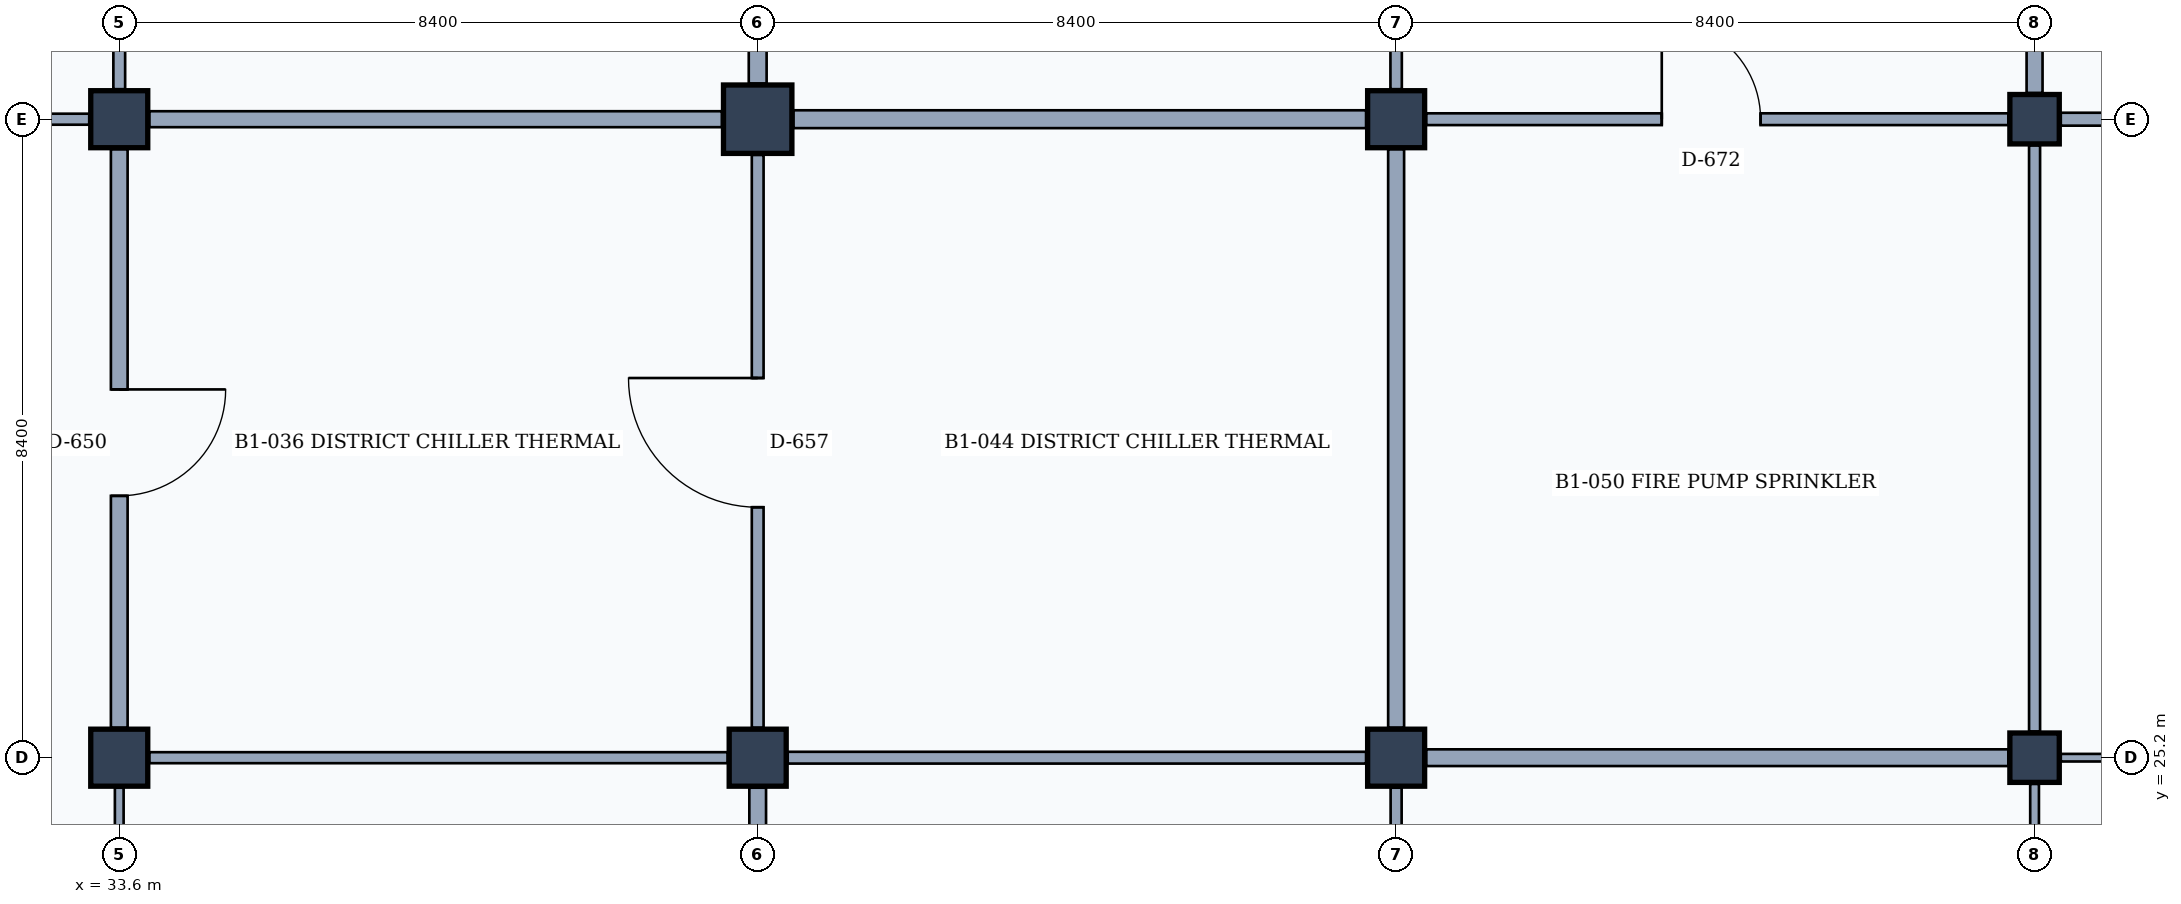
"""IFC4 building model, lengths in metres.
Left out: names, types, materials, properties, quantities, classifications, styles, units other than length and angle.
Written with IfcOpenShell. Run it as: python <this file> out.ifc"""

import sys

from ifc_helpers import new_model, si_unit, direction, frame, frame_2d, origin, origin_2d, place, context, subcontext, project, spatial, rectangle, extrude, element, fill, save


model = new_model("IFC4")
c1 = context("Model", 3, precision=1e-05, world=origin(), true_north=direction((0.0, 1.0)))
c2 = subcontext(c1, "Body", "Model", "MODEL_VIEW")
j1 = project(units=[si_unit("LENGTHUNIT", "METRE"), si_unit("PLANEANGLEUNIT", "RADIAN")], contexts=[c1])
p1 = place(None, origin())
s1 = spatial("IfcSite", under=j1, at=p1, CompositionType="ELEMENT")
p2 = place(p1, origin())
s2 = spatial("IfcBuilding", under=s1, at=p2, CompositionType="ELEMENT")
p3 = place(p2, frame((0.0, 0.0, -4.2)))
s3 = spatial("IfcBuildingStorey", under=s2, at=p3, CompositionType="ELEMENT", Elevation=-4.2)
for number, where, z_axis, x_axis in (
    (1, (33.6, 25.2, 0.0), (0.0, 0.0, 1.0), (1.0, 0.0, 0.0)),
    (2, (33.6, 33.6, 0.0), (0.0, 0.0, 1.0), (1.0, 0.0, 0.0)),
    (3, (42.0, 25.2, 0.0), (0.0, 0.0, 1.0), (1.0, 0.0, 0.0)),
):
    element("IfcColumn", number, at=place(p3, frame(where, z_axis=z_axis, x_axis=x_axis)), inside=s3, PredefinedType="COLUMN", context=c2, shape_type="SweptSolid", body=[
        extrude(rectangle(XDim=0.75, YDim=0.75, at=origin_2d()), origin(), (0.0, 0.0, 1.0), 4.2),
    ])
p4 = place(p3, frame((42.0, 33.6, 0.0), z_axis=(0.0, 0.0, 1.0), x_axis=(1.0, 0.0, 0.0)))
e4 = element("IfcColumn", 4, at=p4, inside=s3, PredefinedType="COLUMN", context=c2, shape_type="SweptSolid", body=[
    extrude(rectangle(XDim=0.9, YDim=0.9, at=origin_2d()), origin(), (0.0, 0.0, 1.0), 4.2),
])
for number, where, z_axis, x_axis in (
    (5, (50.4, 25.2, 0.0), (0.0, 0.0, 1.0), (1.0, 0.0, 0.0)),
    (6, (50.4, 33.6, 0.0), (0.0, 0.0, 1.0), (1.0, 0.0, 0.0)),
):
    element("IfcColumn", number, at=place(p3, frame(where, z_axis=z_axis, x_axis=x_axis)), inside=s3, PredefinedType="COLUMN", context=c2, shape_type="SweptSolid", body=[
        extrude(rectangle(XDim=0.75, YDim=0.75, at=origin_2d()), origin(), (0.0, 0.0, 1.0), 4.2),
    ])
for number, where, z_axis, x_axis in (
    (7, (58.8, 25.2, 0.0), (0.0, 0.0, 1.0), (1.0, 0.0, 0.0)),
    (8, (58.8, 33.6, 0.0), (0.0, 0.0, 1.0), (1.0, 0.0, 0.0)),
):
    element("IfcColumn", number, at=place(p3, frame(where, z_axis=z_axis, x_axis=x_axis)), inside=s3, PredefinedType="COLUMN", context=c2, shape_type="SweptSolid", body=[
        extrude(rectangle(XDim=0.65, YDim=0.65, at=origin_2d()), origin(), (0.0, 0.0, 1.0), 4.2),
    ])
p5 = place(p3, frame((33.6, 17.195, 0.0), z_axis=(0.0, 0.0, 1.0), x_axis=(0.0, 1.0, 0.0)))
e9 = element("IfcWall", 9, at=p5, inside=s3, PredefinedType="PARTITIONING", context=c2, shape_type="SweptSolid", body=[
    extrude(rectangle(XDim=7.61, YDim=0.115, at=frame_2d((3.805, 0.0))), origin(), (0.0, 0.0, 1.0), 3.25),
])
p6 = place(p5, frame((3.15, 0.0, 0.0)))
e10 = element("IfcOpeningElement", 10, at=p6, cuts=e9, PredefinedType="OPENING", context=c2, shape_type="SweptSolid", body=[
    extrude(rectangle(XDim=1.2, YDim=2.2, at=frame_2d((0.6, 1.1))), frame((0.0, 0.067, 0.0), z_axis=(0.0, -1.0, 0.0), x_axis=(1.0, 0.0, 0.0)), (0.0, 0.0, 1.0), 0.135),
])
p7 = place(p3, frame((33.6, 25.595, 0.0), z_axis=(0.0, 0.0, 1.0), x_axis=(0.0, 1.0, 0.0)))
e11 = element("IfcWall", 11, at=p7, inside=s3, PredefinedType="PARTITIONING", context=c2, shape_type="SweptSolid", body=[
    extrude(rectangle(XDim=7.61, YDim=0.22, at=frame_2d((3.805, 0.0))), origin(), (0.0, 0.0, 1.0), 3.25),
])
p8 = place(p7, frame((3.05, 0.0, 0.0)))
e12 = element("IfcOpeningElement", 12, at=p8, cuts=e11, PredefinedType="OPENING", context=c2, shape_type="SweptSolid", body=[
    extrude(rectangle(XDim=1.4, YDim=2.25, at=frame_2d((0.7, 1.125))), frame((0.0, 0.12, 0.0), z_axis=(0.0, -1.0, 0.0), x_axis=(1.0, 0.0, 0.0)), (0.0, 0.0, 1.0), 0.24),
])
p9 = place(p3, frame((25.67, 33.6, 0.0), z_axis=(0.0, 0.0, 1.0), x_axis=(1.0, 0.0, 0.0)))
e13 = element("IfcWall", 13, at=p9, inside=s3, PredefinedType="PARTITIONING", context=c2, shape_type="SweptSolid", body=[
    extrude(rectangle(XDim=7.535, YDim=0.145, at=frame_2d((3.768, 0.0))), origin(), (0.0, 0.0, 1.0), 3.05),
])
p10 = place(p3, frame((33.6, 33.995, 0.0), z_axis=(0.0, 0.0, 1.0), x_axis=(0.0, 1.0, 0.0)))
e14 = element("IfcWall", 14, at=p10, inside=s3, PredefinedType="PARTITIONING", context=c2, shape_type="SweptSolid", body=[
    extrude(rectangle(XDim=7.66, YDim=0.155, at=frame_2d((3.83, 0.0))), origin(), (0.0, 0.0, 1.0), 3.25),
])
p11 = place(p3, frame((42.0, 17.27, 0.0), z_axis=(0.0, 0.0, 1.0), x_axis=(0.0, 1.0, 0.0)))
e15 = element("IfcWall", 15, at=p11, inside=s3, PredefinedType="PARTITIONING", context=c2, shape_type="SweptSolid", body=[
    extrude(rectangle(XDim=7.535, YDim=0.22, at=frame_2d((3.768, 0.0))), origin(), (0.0, 0.0, 1.0), 3.25),
])
p12 = place(p11, frame((2.975, 0.0, 0.0)))
e16 = element("IfcOpeningElement", 16, at=p12, cuts=e15, PredefinedType="OPENING", context=c2, shape_type="SweptSolid", body=[
    extrude(rectangle(XDim=1.55, YDim=2.35, at=frame_2d((0.775, 1.175))), frame((0.0, 0.12, 0.0), z_axis=(0.0, -1.0, 0.0), x_axis=(1.0, 0.0, 0.0)), (0.0, 0.0, 1.0), 0.24),
])
p13 = place(p3, frame((33.995, 25.2, 0.0), z_axis=(0.0, 0.0, 1.0), x_axis=(1.0, 0.0, 0.0)))
e17 = element("IfcWall", 17, at=p13, inside=s3, PredefinedType="PARTITIONING", context=c2, shape_type="SweptSolid", body=[
    extrude(rectangle(XDim=7.61, YDim=0.145, at=frame_2d((3.805, 0.0))), origin(), (0.0, 0.0, 1.0), 3.05),
])
p14 = place(p3, frame((42.0, 25.595, 0.0), z_axis=(0.0, 0.0, 1.0), x_axis=(0.0, 1.0, 0.0)))
e18 = element("IfcWall", 18, at=p14, inside=s3, PredefinedType="PARTITIONING", context=c2, shape_type="SweptSolid", body=[
    extrude(rectangle(XDim=7.535, YDim=0.155, at=frame_2d((3.768, 0.0))), origin(), (0.0, 0.0, 1.0), 3.25),
])
p15 = place(p14, frame((2.9, 0.0, 0.0)))
e19 = element("IfcOpeningElement", 19, at=p15, cuts=e18, PredefinedType="OPENING", context=c2, shape_type="SweptSolid", body=[
    extrude(rectangle(XDim=1.7, YDim=2.3, at=frame_2d((0.85, 1.15))), frame((0.0, 0.087, 0.0), z_axis=(0.0, -1.0, 0.0), x_axis=(1.0, 0.0, 0.0)), (0.0, 0.0, 1.0), 0.175),
])
p16 = place(p3, frame((33.995, 33.6, 0.0), z_axis=(0.0, 0.0, 1.0), x_axis=(1.0, 0.0, 0.0)))
e20 = element("IfcWall", 20, at=p16, inside=s3, PredefinedType="PARTITIONING", context=c2, shape_type="SweptSolid", body=[
    extrude(rectangle(XDim=7.535, YDim=0.21, at=frame_2d((3.768, 0.0))), origin(), (0.0, 0.0, 1.0), 3.05),
])
p17 = place(p3, frame((42.0, 34.07, 0.0), z_axis=(0.0, 0.0, 1.0), x_axis=(0.0, 1.0, 0.0)))
e21 = element("IfcWall", 21, at=p17, inside=s3, PredefinedType="PARTITIONING", context=c2, shape_type="SweptSolid", body=[
    extrude(rectangle(XDim=7.585, YDim=0.235, at=frame_2d((3.792, 0.0))), origin(), (0.0, 0.0, 1.0), 3.25),
])
p18 = place(p3, frame((50.4, 17.195, 0.0), z_axis=(0.0, 0.0, 1.0), x_axis=(0.0, 1.0, 0.0)))
e22 = element("IfcWall", 22, at=p18, inside=s3, PredefinedType="PARTITIONING", context=c2, shape_type="SweptSolid", body=[
    extrude(rectangle(XDim=7.61, YDim=0.145, at=frame_2d((3.805, 0.0))), origin(), (0.0, 0.0, 1.0), 3.25),
])
p19 = place(p18, frame((2.85, 0.0, 0.0)))
e23 = element("IfcOpeningElement", 23, at=p19, cuts=e22, PredefinedType="OPENING", context=c2, shape_type="SweptSolid", body=[
    extrude(rectangle(XDim=1.8, YDim=2.3, at=frame_2d((0.9, 1.15))), frame((0.0, 0.083, 0.0), z_axis=(0.0, -1.0, 0.0), x_axis=(1.0, 0.0, 0.0)), (0.0, 0.0, 1.0), 0.165),
])
p20 = place(p3, frame((42.395, 25.2, 0.0), z_axis=(0.0, 0.0, 1.0), x_axis=(1.0, 0.0, 0.0)))
e24 = element("IfcWall", 24, at=p20, inside=s3, PredefinedType="PARTITIONING", context=c2, shape_type="SweptSolid", body=[
    extrude(rectangle(XDim=7.61, YDim=0.155, at=frame_2d((3.805, 0.0))), origin(), (0.0, 0.0, 1.0), 3.05),
])
p21 = place(p3, frame((50.4, 25.595, 0.0), z_axis=(0.0, 0.0, 1.0), x_axis=(0.0, 1.0, 0.0)))
e25 = element("IfcWall", 25, at=p21, inside=s3, PredefinedType="PARTITIONING", context=c2, shape_type="SweptSolid", body=[
    extrude(rectangle(XDim=7.61, YDim=0.21, at=frame_2d((3.805, 0.0))), origin(), (0.0, 0.0, 1.0), 3.25),
])
p22 = place(p3, frame((42.47, 33.6, 0.0), z_axis=(0.0, 0.0, 1.0), x_axis=(1.0, 0.0, 0.0)))
e26 = element("IfcWall", 26, at=p22, inside=s3, PredefinedType="PARTITIONING", context=c2, shape_type="SweptSolid", body=[
    extrude(rectangle(XDim=7.535, YDim=0.235, at=frame_2d((3.768, 0.0))), origin(), (0.0, 0.0, 1.0), 3.05),
])
p23 = place(p3, frame((50.4, 33.995, 0.0), z_axis=(0.0, 0.0, 1.0), x_axis=(0.0, 1.0, 0.0)))
e27 = element("IfcWall", 27, at=p23, inside=s3, PredefinedType="PARTITIONING", context=c2, shape_type="SweptSolid", body=[
    extrude(rectangle(XDim=7.66, YDim=0.15, at=frame_2d((3.83, 0.0))), origin(), (0.0, 0.0, 1.0), 3.25),
])
p24 = place(p3, frame((58.8, 17.145, 0.0), z_axis=(0.0, 0.0, 1.0), x_axis=(0.0, 1.0, 0.0)))
e28 = element("IfcWall", 28, at=p24, inside=s3, PredefinedType="PARTITIONING", context=c2, shape_type="SweptSolid", body=[
    extrude(rectangle(XDim=7.71, YDim=0.115, at=frame_2d((3.855, 0.0))), origin(), (0.0, 0.0, 1.0), 3.25),
])
p25 = place(p3, frame((50.795, 25.2, 0.0), z_axis=(0.0, 0.0, 1.0), x_axis=(1.0, 0.0, 0.0)))
e29 = element("IfcWall", 29, at=p25, inside=s3, PredefinedType="PARTITIONING", context=c2, shape_type="SweptSolid", body=[
    extrude(rectangle(XDim=7.66, YDim=0.22, at=frame_2d((3.83, 0.0))), origin(), (0.0, 0.0, 1.0), 2.95),
])
p26 = place(p3, frame((58.8, 25.545, 0.0), z_axis=(0.0, 0.0, 1.0), x_axis=(0.0, 1.0, 0.0)))
e30 = element("IfcWall", 30, at=p26, inside=s3, PredefinedType="PARTITIONING", context=c2, shape_type="SweptSolid", body=[
    extrude(rectangle(XDim=7.71, YDim=0.145, at=frame_2d((3.855, 0.0))), origin(), (0.0, 0.0, 1.0), 3.25),
])
p27 = place(p3, frame((50.795, 33.6, 0.0), z_axis=(0.0, 0.0, 1.0), x_axis=(1.0, 0.0, 0.0)))
e31 = element("IfcWall", 31, at=p27, inside=s3, PredefinedType="PARTITIONING", context=c2, shape_type="SweptSolid", body=[
    extrude(rectangle(XDim=7.66, YDim=0.155, at=frame_2d((3.83, 0.0))), origin(), (0.0, 0.0, 1.0), 2.95),
])
p28 = place(p27, frame((3.1, 0.0, 0.0)))
e32 = element("IfcOpeningElement", 32, at=p28, cuts=e31, PredefinedType="OPENING", context=c2, shape_type="SweptSolid", body=[
    extrude(rectangle(XDim=1.3, YDim=2.2, at=frame_2d((0.65, 1.1))), frame((0.0, 0.087, 0.0), z_axis=(0.0, -1.0, 0.0), x_axis=(1.0, 0.0, 0.0)), (0.0, 0.0, 1.0), 0.175),
])
p29 = place(p3, frame((58.8, 33.945, 0.0), z_axis=(0.0, 0.0, 1.0), x_axis=(0.0, 1.0, 0.0)))
e33 = element("IfcWall", 33, at=p29, inside=s3, PredefinedType="PARTITIONING", context=c2, shape_type="SweptSolid", body=[
    extrude(rectangle(XDim=7.71, YDim=0.21, at=frame_2d((3.855, 0.0))), origin(), (0.0, 0.0, 1.0), 3.25),
])
p30 = place(p3, frame((59.145, 25.2, 0.0), z_axis=(0.0, 0.0, 1.0), x_axis=(1.0, 0.0, 0.0)))
e34 = element("IfcWall", 34, at=p30, inside=s3, PredefinedType="MOVABLE", context=c2, shape_type="SweptSolid", body=[
    extrude(rectangle(XDim=7.71, YDim=0.1, at=frame_2d((3.855, 0.0))), origin(), (0.0, 0.0, 1.0), 2.95),
])
p31 = place(p30, frame((3.125, 0.0, 0.0)))
e35 = element("IfcOpeningElement", 35, at=p31, cuts=e34, PredefinedType="OPENING", context=c2, shape_type="SweptSolid", body=[
    extrude(rectangle(XDim=1.25, YDim=2.3, at=frame_2d((0.625, 1.15))), frame((0.0, 0.06, 0.0), z_axis=(0.0, -1.0, 0.0), x_axis=(1.0, 0.0, 0.0)), (0.0, 0.0, 1.0), 0.12),
])
p32 = place(p3, frame((59.145, 33.6, 0.0), z_axis=(0.0, 0.0, 1.0), x_axis=(1.0, 0.0, 0.0)))
e36 = element("IfcWall", 36, at=p32, inside=s3, PredefinedType="PARTITIONING", context=c2, shape_type="SweptSolid", body=[
    extrude(rectangle(XDim=7.71, YDim=0.17, at=frame_2d((3.855, 0.0))), origin(), (0.0, 0.0, 1.0), 2.95),
])
p33 = place(p32, frame((3.075, 0.0, 0.0)))
e37 = element("IfcOpeningElement", 37, at=p33, cuts=e36, PredefinedType="OPENING", context=c2, shape_type="SweptSolid", body=[
    extrude(rectangle(XDim=1.35, YDim=2.25, at=frame_2d((0.675, 1.125))), frame((0.0, 0.095, 0.0), z_axis=(0.0, -1.0, 0.0), x_axis=(1.0, 0.0, 0.0)), (0.0, 0.0, 1.0), 0.19),
])
p34 = place(p8, frame((1.4, 0.0, 0.0), z_axis=(0.0, 0.0, 1.0), x_axis=(-1.0, 0.0, 0.0)))
e38 = element("IfcDoor", 38, at=p34, inside=s3, OperationType="SINGLE_SWING_LEFT", PredefinedType="DOOR", context=c2, shape_type="SweptSolid", body=[
    extrude(rectangle(XDim=1.4, YDim=2.25, at=frame_2d((0.7, 1.125))), frame((0.0, 0.025, 0.0), z_axis=(0.0, -1.0, 0.0), x_axis=(1.0, 0.0, 0.0)), (0.0, 0.0, 1.0), 0.05),
])
fill(e12, e38)
p35 = place(p15, origin())
e39 = element("IfcDoor", 39, at=p35, inside=s3, OperationType="SINGLE_SWING_RIGHT", PredefinedType="DOOR", context=c2, shape_type="SweptSolid", body=[
    extrude(rectangle(XDim=1.7, YDim=2.3, at=frame_2d((0.85, 1.15))), frame((0.0, 0.025, 0.0), z_axis=(0.0, -1.0, 0.0), x_axis=(1.0, 0.0, 0.0)), (0.0, 0.0, 1.0), 0.05),
])
fill(e19, e39)
p36 = place(p28, origin())
e40 = element("IfcDoor", 40, at=p36, inside=s3, OperationType="SINGLE_SWING_LEFT", PredefinedType="DOOR", context=c2, shape_type="SweptSolid", body=[
    extrude(rectangle(XDim=1.3, YDim=2.2, at=frame_2d((0.65, 1.1))), frame((0.0, 0.025, 0.0), z_axis=(0.0, -1.0, 0.0), x_axis=(1.0, 0.0, 0.0)), (0.0, 0.0, 1.0), 0.05),
])
fill(e32, e40)
save(model, sys.argv[1])
